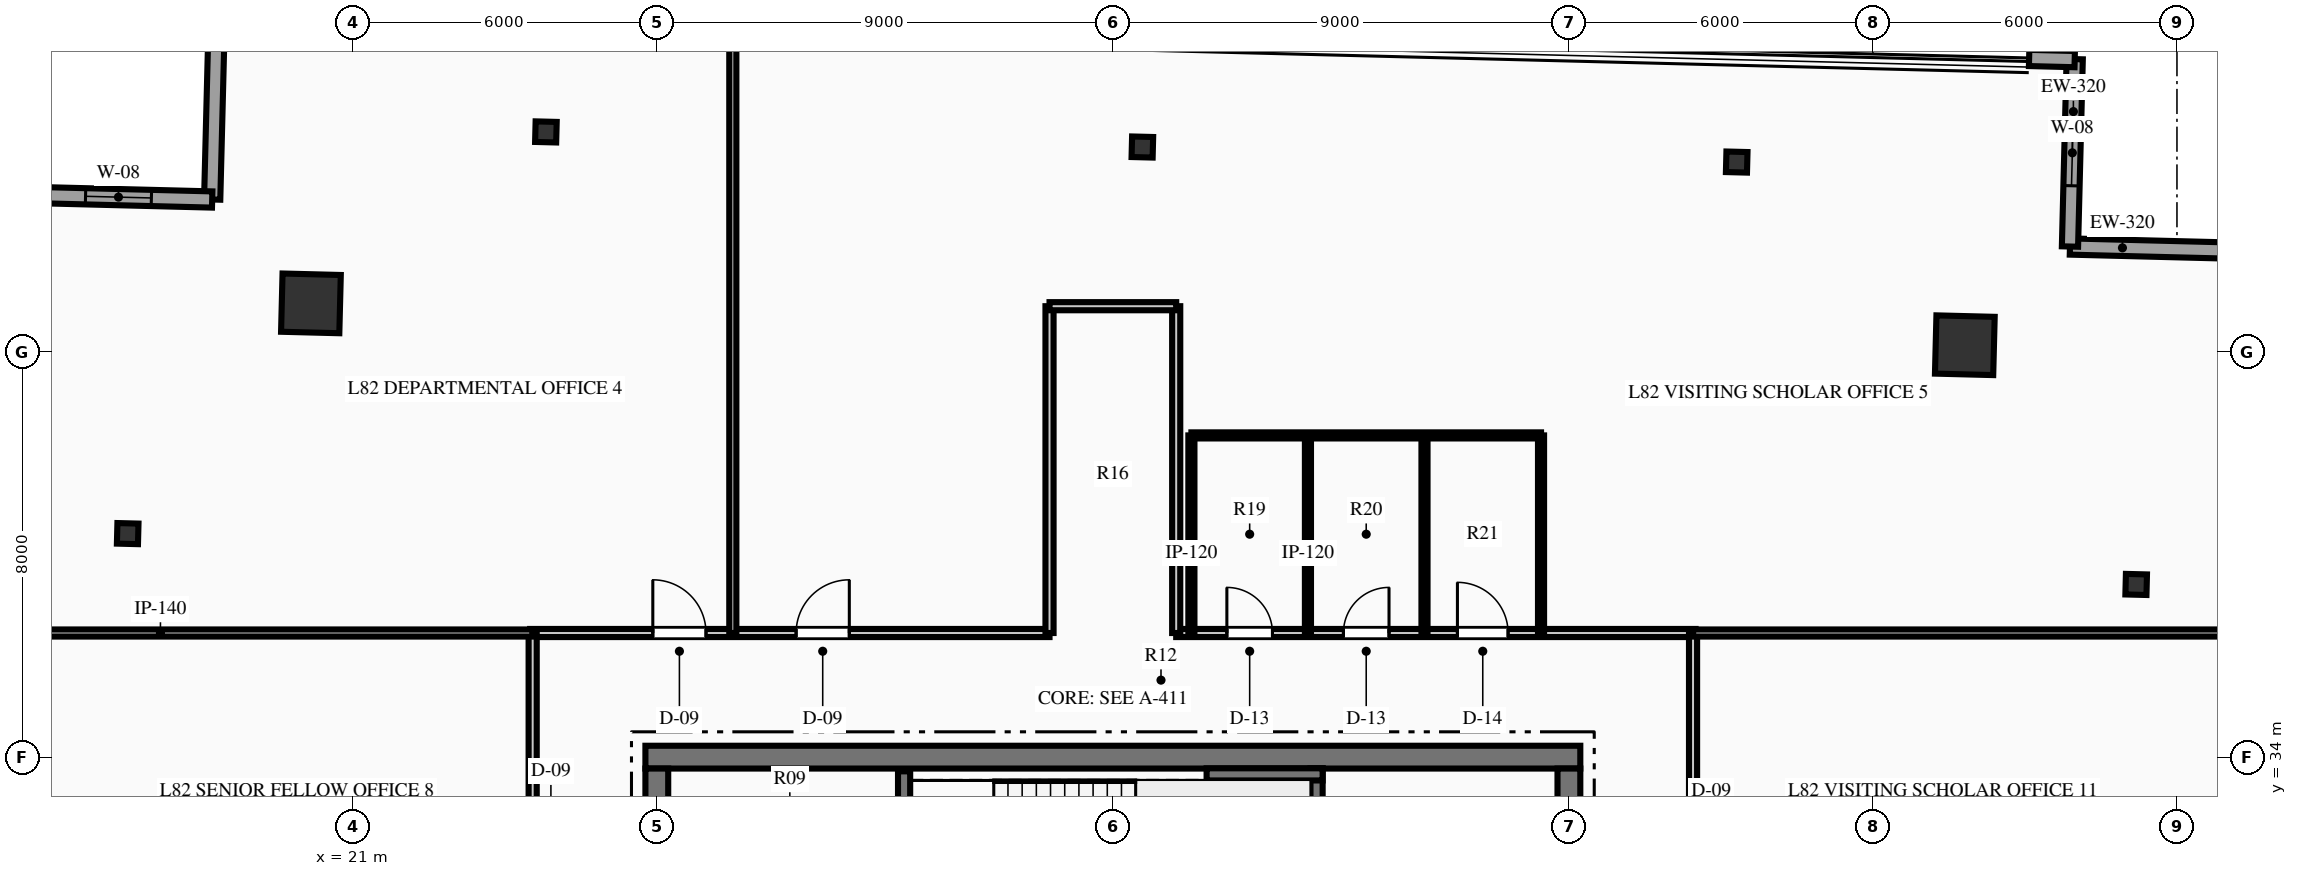
"""IFC4 building model, lengths in metres.
Left out: names, types, materials, properties, quantities, classifications, styles, units other than length and angle.
Written with IfcOpenShell. Run it as: python <this file> out.ifc"""

import sys

from ifc_helpers import new_model, si_unit, direction, frame, frame_2d, origin, origin_2d, place, context, subcontext, project, spatial, rectangle, hollow_rectangle, i_section, extrude, element, fill, save


model = new_model("IFC4")
c1 = context("Model", 3, precision=1e-05, world=origin(), true_north=direction((0.0, 1.0)))
c2 = subcontext(c1, "Body", "Model", "MODEL_VIEW")
j1 = project(units=[si_unit("LENGTHUNIT", "METRE"), si_unit("PLANEANGLEUNIT", "RADIAN")], contexts=[c1])
p1 = place(None, origin())
s1 = spatial("IfcSite", under=j1, at=p1, CompositionType="ELEMENT")
p2 = place(p1, origin())
s2 = spatial("IfcBuilding", under=s1, at=p2, CompositionType="ELEMENT")
p3 = place(p2, frame((0.0, 0.0, 325.2)))
s3 = spatial("IfcBuildingStorey", under=s2, at=p3, CompositionType="ELEMENT", Elevation=325.2)
p4 = place(p3, frame((26.775, 34.0, 0.0), z_axis=(0.0, 0.0, 1.0), x_axis=(1.0, 0.0, 0.0)))
e1 = element("IfcWall", 1, at=p4, inside=s3, PredefinedType="SHEAR", context=c2, shape_type="SweptSolid", body=[
    extrude(rectangle(XDim=18.45, YDim=0.45, at=frame_2d((9.225, 0.0))), origin(), (0.0, 0.0, 1.0), 3.75),
])
p5 = place(p3, frame((27.0, 18.225, 0.0), z_axis=(0.0, 0.0, 1.0), x_axis=(0.0, 1.0, 0.0)))
e2 = element("IfcWall", 2, at=p5, inside=s3, PredefinedType="SHEAR", context=c2, shape_type="SweptSolid", body=[
    extrude(rectangle(XDim=15.55, YDim=0.45, at=frame_2d((7.775, 0.0))), origin(), (0.0, 0.0, 1.0), 3.75),
])
p6 = place(p5, frame((10.015, 0.0, 0.0)))
e3 = element("IfcOpeningElement", 3, at=p6, cuts=e2, PredefinedType="OPENING", context=c2, shape_type="SweptSolid", body=[
    extrude(rectangle(XDim=1.4, YDim=2.2, at=frame_2d((0.7, 1.1))), frame((0.0, 0.235, 0.0), z_axis=(0.0, -1.0, 0.0), x_axis=(1.0, 0.0, 0.0)), (0.0, 0.0, 1.0), 0.47),
])
p7 = place(p3, frame((45.0, 18.225, 0.0), z_axis=(0.0, 0.0, 1.0), x_axis=(0.0, 1.0, 0.0)))
e4 = element("IfcWall", 4, at=p7, inside=s3, PredefinedType="SHEAR", context=c2, shape_type="SweptSolid", body=[
    extrude(rectangle(XDim=15.55, YDim=0.45, at=frame_2d((7.775, 0.0))), origin(), (0.0, 0.0, 1.0), 3.75),
])
p8 = place(p7, frame((10.015, 0.0, 0.0)))
e5 = element("IfcOpeningElement", 5, at=p8, cuts=e4, PredefinedType="OPENING", context=c2, shape_type="SweptSolid", body=[
    extrude(rectangle(XDim=1.4, YDim=2.2, at=frame_2d((0.7, 1.1))), frame((0.0, 0.235, 0.0), z_axis=(0.0, -1.0, 0.0), x_axis=(1.0, 0.0, 0.0)), (0.0, 0.0, 1.0), 0.47),
])
p9 = place(p3, frame((31.88, 29.93, 0.0), z_axis=(0.0, 0.0, 1.0), x_axis=(0.0, 1.0, 0.0)))
e6 = element("IfcWall", 6, at=p9, inside=s3, PredefinedType="SHEAR", context=c2, shape_type="SweptSolid", body=[
    extrude(rectangle(XDim=3.79, YDim=0.24, at=frame_2d((1.895, 0.0))), origin(), (0.0, 0.0, 1.0), 3.75),
])
p10 = place(p3, frame((40.02, 29.93, 0.0), z_axis=(0.0, 0.0, 1.0), x_axis=(0.0, 1.0, 0.0)))
e7 = element("IfcWall", 7, at=p10, inside=s3, PredefinedType="SHEAR", context=c2, shape_type="SweptSolid", body=[
    extrude(rectangle(XDim=3.85, YDim=0.24, at=frame_2d((1.925, 0.0))), origin(), (0.0, 0.0, 1.0), 3.75),
])
p11 = place(p3, frame((37.85, 33.66, 0.0), z_axis=(0.0, 0.0, 1.0), x_axis=(1.0, 0.0, 0.0)))
e8 = element("IfcWall", 8, at=p11, inside=s3, PredefinedType="SHEAR", context=c2, shape_type="SweptSolid", body=[
    extrude(rectangle(XDim=2.29, YDim=0.24, at=frame_2d((1.145, 0.0))), origin(), (0.0, 0.0, 1.0), 3.75),
])
for number, where, z_axis, x_axis in (
    (9, (52.813, 42.13, 0.0), (0.0, 0.0, 1.0), (0.025, 1.0, 0.0)),
    (10, (20.174, 42.956, 0.0), (0.0, 0.0, 1.0), (0.025, 1.0, 0.0)),
):
    element("IfcColumn", number, at=place(p3, frame(where, z_axis=z_axis, x_axis=x_axis)), inside=s3, PredefinedType="COLUMN", context=c2, shape_type="SweptSolid", body=[
        extrude(hollow_rectangle(XDim=1.15, YDim=1.15, WallThickness=0.05, at=origin_2d()), origin(), (0.0, 0.0, 1.0), 3.75),
    ])
for number, where, z_axis, x_axis in (
    (11, (56.195, 37.409, 0.0), (0.0, 0.0, 1.0), (0.025, 1.0, 0.0)),
    (12, (48.312, 45.745, 0.0), (0.0, 0.0, 1.0), (0.025, 1.0, 0.0)),
    (13, (36.582, 46.042, 0.0), (0.0, 0.0, 1.0), (0.025, 1.0, 0.0)),
    (14, (24.811, 46.34, 0.0), (0.0, 0.0, 1.0), (0.025, 1.0, 0.0)),
    (15, (16.558, 38.412, 0.0), (0.0, 0.0, 1.0), (0.025, 1.0, 0.0)),
):
    element("IfcColumn", number, at=place(p3, frame(where, z_axis=z_axis, x_axis=x_axis)), inside=s3, PredefinedType="COLUMN", context=c2, shape_type="SweptSolid", body=[
        extrude(i_section(OverallWidth=0.406, OverallDepth=0.416, WebThickness=0.03, FlangeThickness=0.048, at=origin_2d()), origin(), (0.0, 0.0, 1.0), 3.75),
    ])
p12 = place(p3, frame((54.888, 44.078, 0.0), z_axis=(0.0, 0.0, 1.0), x_axis=(0.999678973645, -0.025336725357, 0.0)))
e16 = element("IfcWall", 16, at=p12, inside=s3, PredefinedType="STANDARD", context=c2, shape_type="SweptSolid", body=[
    extrude(rectangle(XDim=3.7, YDim=0.32, at=frame_2d((1.85, 0.0))), origin(), (0.0, 0.0, 1.0), 3.49),
])
p13 = place(p3, frame((54.982, 47.777, 0.0), z_axis=(0.0, 0.0, 1.0), x_axis=(-0.025338396674, -0.999678931284, 0.0)))
e17 = element("IfcWall", 17, at=p13, inside=s3, PredefinedType="STANDARD", context=c2, shape_type="SweptSolid", body=[
    extrude(rectangle(XDim=3.7, YDim=0.32, at=frame_2d((1.85, 0.0))), origin(), (0.0, 0.0, 1.0), 3.49),
])
p14 = place(p13, frame((1.2, 0.0, 0.85)))
e18 = element("IfcOpeningElement", 18, at=p14, cuts=e17, PredefinedType="OPENING", context=c2, shape_type="SweptSolid", body=[
    extrude(rectangle(XDim=1.3, YDim=1.9, at=frame_2d((0.65, 0.95))), frame((0.0, 0.17, 0.0), z_axis=(0.0, -1.0, 0.0), x_axis=(1.0, 0.0, 0.0)), (0.0, 0.0, 1.0), 0.34),
])
p15 = place(p3, frame((54.083, 47.799, 0.0), z_axis=(0.0, 0.0, 1.0), x_axis=(0.99968168763, -0.025229415726, 0.0)))
e19 = element("IfcWall", 19, at=p15, inside=s3, PredefinedType="STANDARD", context=c2, shape_type="SweptSolid", body=[
    extrude(rectangle(XDim=0.9, YDim=0.32, at=frame_2d((0.45, 0.0))), origin(), (0.0, 0.0, 1.0), 3.49),
])
p16 = place(p3, frame((18.225, 45.006, 0.0), z_axis=(0.0, 0.0, 1.0), x_axis=(0.025338396674, 0.999678931284, 0.0)))
e20 = element("IfcWall", 20, at=p16, inside=s3, PredefinedType="STANDARD", context=c2, shape_type="SweptSolid", body=[
    extrude(rectangle(XDim=3.7, YDim=0.32, at=frame_2d((1.85, 0.0))), origin(), (0.0, 0.0, 1.0), 3.49),
])
p17 = place(p3, frame((14.526, 45.1, 0.0), z_axis=(0.0, 0.0, 1.0), x_axis=(0.999678931284, -0.025338396674, 0.0)))
e21 = element("IfcWall", 21, at=p17, inside=s3, PredefinedType="STANDARD", context=c2, shape_type="SweptSolid", body=[
    extrude(rectangle(XDim=3.7, YDim=0.32, at=frame_2d((1.85, 0.0))), origin(), (0.0, 0.0, 1.0), 3.49),
])
p18 = place(p17, frame((1.2, 0.0, 0.85)))
e22 = element("IfcOpeningElement", 22, at=p18, cuts=e21, PredefinedType="OPENING", context=c2, shape_type="SweptSolid", body=[
    extrude(rectangle(XDim=1.3, YDim=1.9, at=frame_2d((0.65, 0.95))), frame((0.0, 0.17, 0.0), z_axis=(0.0, -1.0, 0.0), x_axis=(1.0, 0.0, 0.0)), (0.0, 0.0, 1.0), 0.34),
])
p19 = place(p3, frame((24.5, 36.45, 0.0), z_axis=(0.0, 0.0, 1.0), x_axis=(1.0, 0.0, 0.0)))
e23 = element("IfcWall", 23, at=p19, inside=s3, PredefinedType="PARTITIONING", context=c2, shape_type="SweptSolid", body=[
    extrude(rectangle(XDim=10.25, YDim=0.16, at=frame_2d((5.125, 0.0))), origin(), (0.0, 0.0, 1.0), 3.49),
])
p20 = place(p19, frame((2.421, 0.0, 0.0)))
e24 = element("IfcOpeningElement", 24, at=p20, cuts=e23, PredefinedType="OPENING", context=c2, shape_type="SweptSolid", body=[
    extrude(rectangle(XDim=1.05, YDim=2.15, at=frame_2d((0.525, 1.075))), frame((0.0, 0.09, 0.0), z_axis=(0.0, -1.0, 0.0), x_axis=(1.0, 0.0, 0.0)), (0.0, 0.0, 1.0), 0.18),
])
p21 = place(p19, frame((5.249, 0.0, 0.0)))
e25 = element("IfcOpeningElement", 25, at=p21, cuts=e23, PredefinedType="OPENING", context=c2, shape_type="SweptSolid", body=[
    extrude(rectangle(XDim=1.05, YDim=2.15, at=frame_2d((0.525, 1.075))), frame((0.0, 0.09, 0.0), z_axis=(0.0, -1.0, 0.0), x_axis=(1.0, 0.0, 0.0)), (0.0, 0.0, 1.0), 0.18),
])
p22 = place(p3, frame((37.25, 36.45, 0.0), z_axis=(0.0, 0.0, 1.0), x_axis=(1.0, 0.0, 0.0)))
e26 = element("IfcWall", 26, at=p22, inside=s3, PredefinedType="PARTITIONING", context=c2, shape_type="SweptSolid", body=[
    extrude(rectangle(XDim=10.25, YDim=0.16, at=frame_2d((5.125, 0.0))), origin(), (0.0, 0.0, 1.0), 3.49),
])
p23 = place(p22, frame((1.0, 0.0, 0.0)))
e27 = element("IfcOpeningElement", 27, at=p23, cuts=e26, PredefinedType="OPENING", context=c2, shape_type="SweptSolid", body=[
    extrude(rectangle(XDim=0.9, YDim=2.15, at=frame_2d((0.45, 1.075))), frame((0.0, 0.09, 0.0), z_axis=(0.0, -1.0, 0.0), x_axis=(1.0, 0.0, 0.0)), (0.0, 0.0, 1.0), 0.18),
])
p24 = place(p22, frame((3.3, 0.0, 0.0)))
e28 = element("IfcOpeningElement", 28, at=p24, cuts=e26, PredefinedType="OPENING", context=c2, shape_type="SweptSolid", body=[
    extrude(rectangle(XDim=0.9, YDim=2.15, at=frame_2d((0.45, 1.075))), frame((0.0, 0.09, 0.0), z_axis=(0.0, -1.0, 0.0), x_axis=(1.0, 0.0, 0.0)), (0.0, 0.0, 1.0), 0.18),
])
p25 = place(p22, frame((5.55, 0.0, 0.0)))
e29 = element("IfcOpeningElement", 29, at=p25, cuts=e26, PredefinedType="OPENING", context=c2, shape_type="SweptSolid", body=[
    extrude(rectangle(XDim=1.0, YDim=2.15, at=frame_2d((0.5, 1.075))), frame((0.0, 0.09, 0.0), z_axis=(0.0, -1.0, 0.0), x_axis=(1.0, 0.0, 0.0)), (0.0, 0.0, 1.0), 0.18),
])
p26 = place(p3, frame((24.55, 27.25, 0.0), z_axis=(0.0, 0.0, 1.0), x_axis=(0.0, 1.0, 0.0)))
e30 = element("IfcWall", 30, at=p26, inside=s3, PredefinedType="PARTITIONING", context=c2, shape_type="SweptSolid", body=[
    extrude(rectangle(XDim=9.2, YDim=0.16, at=frame_2d((4.6, 0.0))), origin(), (0.0, 0.0, 1.0), 3.49),
])
p27 = place(p26, frame((4.594, 0.0, 0.0)))
e31 = element("IfcOpeningElement", 31, at=p27, cuts=e30, PredefinedType="OPENING", context=c2, shape_type="SweptSolid", body=[
    extrude(rectangle(XDim=1.05, YDim=2.15, at=frame_2d((0.525, 1.075))), frame((0.0, 0.09, 0.0), z_axis=(0.0, -1.0, 0.0), x_axis=(1.0, 0.0, 0.0)), (0.0, 0.0, 1.0), 0.18),
])
p28 = place(p3, frame((47.45, 27.25, 0.0), z_axis=(0.0, 0.0, 1.0), x_axis=(0.0, 1.0, 0.0)))
e32 = element("IfcWall", 32, at=p28, inside=s3, PredefinedType="PARTITIONING", context=c2, shape_type="SweptSolid", body=[
    extrude(rectangle(XDim=9.2, YDim=0.16, at=frame_2d((4.6, 0.0))), origin(), (0.0, 0.0, 1.0), 3.49),
])
p29 = place(p28, frame((4.199, 0.0, 0.0)))
e33 = element("IfcOpeningElement", 33, at=p29, cuts=e32, PredefinedType="OPENING", context=c2, shape_type="SweptSolid", body=[
    extrude(rectangle(XDim=1.05, YDim=2.15, at=frame_2d((0.525, 1.075))), frame((0.0, 0.09, 0.0), z_axis=(0.0, -1.0, 0.0), x_axis=(1.0, 0.0, 0.0)), (0.0, 0.0, 1.0), 0.18),
])
for number, where, z_axis, x_axis in (
    (34, (34.75, 36.45, 0.0), (0.0, 0.0, 1.0), (0.0, 1.0, 0.0)),
    (35, (37.25, 36.45, 0.0), (0.0, 0.0, 1.0), (0.0, 1.0, 0.0)),
):
    element("IfcWall", number, at=place(p3, frame(where, z_axis=z_axis, x_axis=x_axis)), inside=s3, PredefinedType="PARTITIONING", context=c2, shape_type="SweptSolid", body=[
        extrude(rectangle(XDim=6.45, YDim=0.16, at=frame_2d((3.225, 0.0))), origin(), (0.0, 0.0, 1.0), 3.49),
    ])
p30 = place(p3, frame((34.75, 42.9, 0.0), z_axis=(0.0, 0.0, 1.0), x_axis=(1.0, 0.0, 0.0)))
e36 = element("IfcWall", 36, at=p30, inside=s3, PredefinedType="PARTITIONING", context=c2, shape_type="SweptSolid", body=[
    extrude(rectangle(XDim=2.5, YDim=0.16, at=frame_2d((1.25, 0.0))), origin(), (0.0, 0.0, 1.0), 3.49),
])
for number, where, z_axis, x_axis in (
    (37, (37.55, 36.45, 0.0), (0.0, 0.0, 1.0), (0.0, 1.0, 0.0)),
    (38, (39.85, 36.45, 0.0), (0.0, 0.0, 1.0), (0.0, 1.0, 0.0)),
    (39, (42.15, 36.45, 0.0), (0.0, 0.0, 1.0), (0.0, 1.0, 0.0)),
    (40, (44.45, 36.45, 0.0), (0.0, 0.0, 1.0), (0.0, 1.0, 0.0)),
):
    element("IfcWall", number, at=place(p3, frame(where, z_axis=z_axis, x_axis=x_axis)), inside=s3, PredefinedType="PARTITIONING", context=c2, shape_type="SweptSolid", body=[
        extrude(rectangle(XDim=3.9, YDim=0.12, at=frame_2d((1.95, 0.0))), origin(), (0.0, 0.0, 1.0), 3.49),
    ])
p31 = place(p3, frame((37.55, 40.35, 0.0), z_axis=(0.0, 0.0, 1.0), x_axis=(1.0, 0.0, 0.0)))
e41 = element("IfcWall", 41, at=p31, inside=s3, PredefinedType="PARTITIONING", context=c2, shape_type="SweptSolid", body=[
    extrude(rectangle(XDim=6.9, YDim=0.12, at=frame_2d((3.45, 0.0))), origin(), (0.0, 0.0, 1.0), 3.49),
])
p32 = place(p3, frame((14.347, 36.45, 0.0), z_axis=(0.0, 0.0, 1.0), x_axis=(1.0, 0.0, 0.0)))
e42 = element("IfcWall", 42, at=p32, inside=s3, PredefinedType="PARTITIONING", context=c2, shape_type="SweptSolid", body=[
    extrude(rectangle(XDim=10.203, YDim=0.14, at=frame_2d((5.101, 0.0))), origin(), (0.0, 0.0, 1.0), 2.868),
])
p33 = place(p3, frame((47.45, 36.45, 0.0), z_axis=(0.0, 0.0, 1.0), x_axis=(1.0, 0.0, 0.0)))
e43 = element("IfcWall", 43, at=p33, inside=s3, PredefinedType="PARTITIONING", context=c2, shape_type="SweptSolid", body=[
    extrude(rectangle(XDim=10.907, YDim=0.14, at=frame_2d((5.453, 0.0))), origin(), (0.0, 0.0, 1.0), 2.868),
])
p34 = place(p3, frame((28.5, 36.45, 0.0), z_axis=(0.0, 0.0, 1.0), x_axis=(0.0, 1.0, 0.0)))
e44 = element("IfcWall", 44, at=p34, inside=s3, PredefinedType="PARTITIONING", context=c2, shape_type="SweptSolid", body=[
    extrude(rectangle(XDim=11.957, YDim=0.14, at=frame_2d((5.979, 0.0))), origin(), (0.0, 0.0, 1.0), 3.49),
])
p35 = place(p14, origin())
e45 = element("IfcWindow", 45, at=p35, inside=s3, PartitioningType="SINGLE_PANEL", PredefinedType="WINDOW", context=c2, shape_type="SweptSolid", body=[
    extrude(rectangle(XDim=1.3, YDim=1.9, at=frame_2d((0.65, 0.95))), frame((0.0, 0.03, 0.0), z_axis=(0.0, -1.0, 0.0), x_axis=(1.0, 0.0, 0.0)), (0.0, 0.0, 1.0), 0.06),
])
fill(e18, e45)
p36 = place(p18, origin())
e46 = element("IfcWindow", 46, at=p36, inside=s3, PartitioningType="SINGLE_PANEL", PredefinedType="WINDOW", context=c2, shape_type="SweptSolid", body=[
    extrude(rectangle(XDim=1.3, YDim=1.9, at=frame_2d((0.65, 0.95))), frame((0.0, 0.03, 0.0), z_axis=(0.0, -1.0, 0.0), x_axis=(1.0, 0.0, 0.0)), (0.0, 0.0, 1.0), 0.06),
])
fill(e22, e46)
p37 = place(p23, origin())
e47 = element("IfcDoor", 47, at=p37, inside=s3, OperationType="SINGLE_SWING_LEFT", PredefinedType="DOOR", context=c2, shape_type="SweptSolid", body=[
    extrude(rectangle(XDim=0.9, YDim=2.15, at=frame_2d((0.45, 1.075))), frame((0.0, 0.025, 0.0), z_axis=(0.0, -1.0, 0.0), x_axis=(1.0, 0.0, 0.0)), (0.0, 0.0, 1.0), 0.05),
])
fill(e27, e47)
p38 = place(p24, origin())
e48 = element("IfcDoor", 48, at=p38, inside=s3, OperationType="SINGLE_SWING_RIGHT", PredefinedType="DOOR", context=c2, shape_type="SweptSolid", body=[
    extrude(rectangle(XDim=0.9, YDim=2.15, at=frame_2d((0.45, 1.075))), frame((0.0, 0.025, 0.0), z_axis=(0.0, -1.0, 0.0), x_axis=(1.0, 0.0, 0.0)), (0.0, 0.0, 1.0), 0.05),
])
fill(e28, e48)
p39 = place(p25, origin())
e49 = element("IfcDoor", 49, at=p39, inside=s3, OperationType="SINGLE_SWING_LEFT", PredefinedType="DOOR", context=c2, shape_type="SweptSolid", body=[
    extrude(rectangle(XDim=1.0, YDim=2.15, at=frame_2d((0.5, 1.075))), frame((0.0, 0.025, 0.0), z_axis=(0.0, -1.0, 0.0), x_axis=(1.0, 0.0, 0.0)), (0.0, 0.0, 1.0), 0.05),
])
fill(e29, e49)
p40 = place(p20, origin())
e50 = element("IfcDoor", 50, at=p40, inside=s3, OperationType="SINGLE_SWING_LEFT", PredefinedType="DOOR", context=c2, shape_type="SweptSolid", body=[
    extrude(rectangle(XDim=1.05, YDim=2.15, at=frame_2d((0.525, 1.075))), frame((0.0, 0.025, 0.0), z_axis=(0.0, -1.0, 0.0), x_axis=(1.0, 0.0, 0.0)), (0.0, 0.0, 1.0), 0.05),
])
fill(e24, e50)
p41 = place(p21, origin())
e51 = element("IfcDoor", 51, at=p41, inside=s3, OperationType="SINGLE_SWING_RIGHT", PredefinedType="DOOR", context=c2, shape_type="SweptSolid", body=[
    extrude(rectangle(XDim=1.05, YDim=2.15, at=frame_2d((0.525, 1.075))), frame((0.0, 0.025, 0.0), z_axis=(0.0, -1.0, 0.0), x_axis=(1.0, 0.0, 0.0)), (0.0, 0.0, 1.0), 0.05),
])
fill(e25, e51)
save(model, sys.argv[1])
